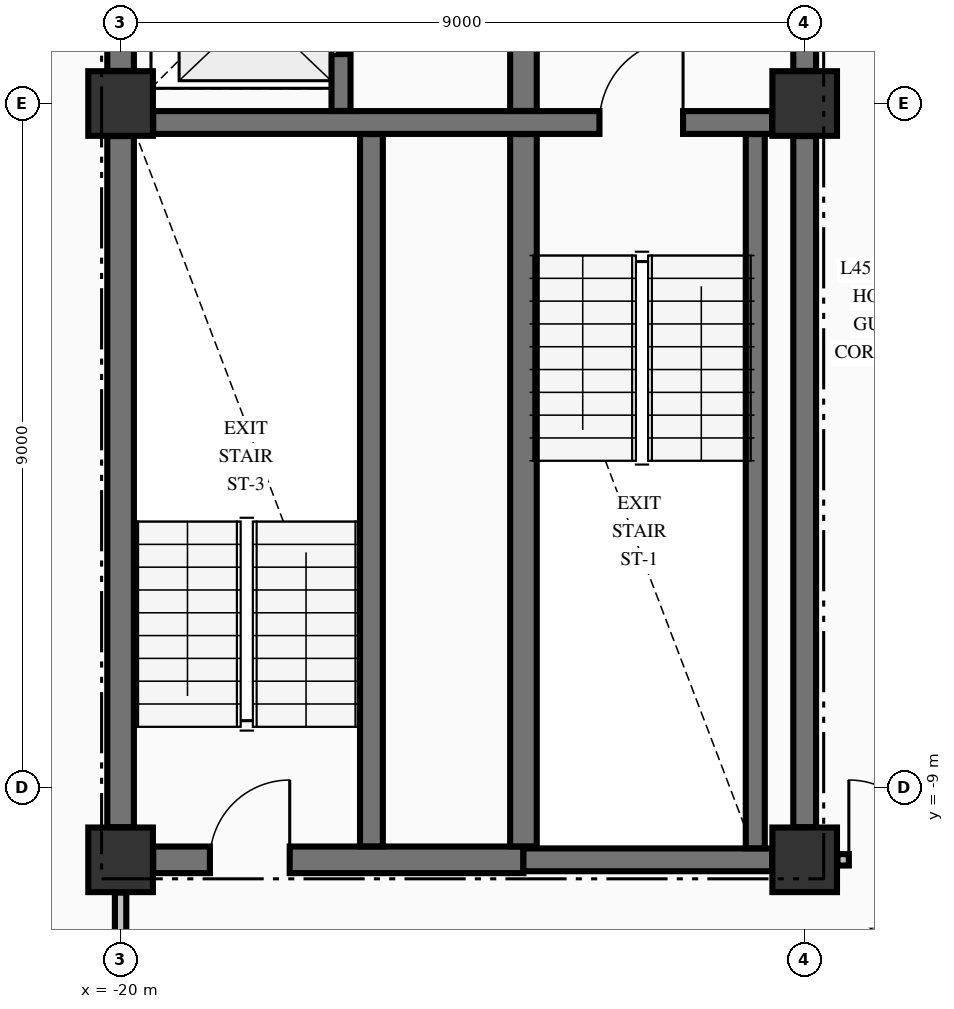
"""IFC4 building model, lengths in metres.
Left out: names, types, materials, properties, quantities, classifications, styles, units other than length and angle.
Written with IfcOpenShell. Run it as: python <this file> out.ifc"""

import sys

from ifc_helpers import new_model, si_unit, direction, frame, frame_2d, origin, origin_2d, place, context, subcontext, project, spatial, rectangle, extrude, element, fill, save


model = new_model("IFC4")
c1 = context("Model", 3, precision=1e-05, world=origin(), true_north=direction((0.0, 1.0)))
c2 = subcontext(c1, "Body", "Model", "MODEL_VIEW")
j1 = project(units=[si_unit("LENGTHUNIT", "METRE"), si_unit("PLANEANGLEUNIT", "RADIAN")], contexts=[c1])
p1 = place(None, origin())
s1 = spatial("IfcSite", under=j1, at=p1, CompositionType="ELEMENT")
p2 = place(p1, origin())
s2 = spatial("IfcBuilding", under=s1, at=p2, CompositionType="ELEMENT")
p3 = place(p2, frame((0.0, 0.0, 176.26)))
s3 = spatial("IfcBuildingStorey", under=s2, at=p3, CompositionType="ELEMENT", Elevation=176.26)
for number, where, z_axis, x_axis in (
    (1, (-20.0, -9.95, -0.275), (0.0, 0.0, 1.0), (1.0, 0.0, 0.0)),
    (2, (-11.0, -9.95, -0.275), (0.0, 0.0, 1.0), (1.0, 0.0, 0.0)),
    (3, (-11.0, 0.0, -0.275), (0.0, 0.0, 1.0), (1.0, 0.0, 0.0)),
    (4, (-20.0, 0.0, -0.275), (0.0, 0.0, 1.0), (1.0, 0.0, 0.0)),
):
    element("IfcColumn", number, at=place(p3, frame(where, z_axis=z_axis, x_axis=x_axis)), inside=s3, PredefinedType="COLUMN", context=c2, shape_type="SweptSolid", body=[
        extrude(rectangle(XDim=0.85, YDim=0.85, at=origin_2d()), origin(), (0.0, 0.0, 1.0), 3.425),
    ])
p4 = place(p3, frame((-19.571, -9.95, 0.0), z_axis=(0.0, 0.0, 1.0), x_axis=(1.0, 0.0, 0.0)))
e5 = element("IfcWall", 5, at=p4, inside=s3, PredefinedType="SHEAR", context=c2, shape_type="SweptSolid", body=[
    extrude(rectangle(XDim=4.871, YDim=0.35, at=frame_2d((2.436, 0.0))), origin(), (0.0, 0.0, 1.0), 3.15),
])
p5 = place(p4, frame((0.746, 0.0, 0.0)))
e6 = element("IfcOpeningElement", 6, at=p5, cuts=e5, PredefinedType="OPENING", context=c2, shape_type="SweptSolid", body=[
    extrude(rectangle(XDim=1.05, YDim=2.15, at=frame_2d((0.525, 1.075))), frame((0.0, 0.185, 0.0), z_axis=(0.0, -1.0, 0.0), x_axis=(1.0, 0.0, 0.0)), (0.0, 0.0, 1.0), 0.37),
])
p6 = place(p3, frame((-14.7, -9.95, 0.0), z_axis=(0.0, 0.0, 1.0), x_axis=(1.0, 0.0, 0.0)))
e7 = element("IfcWall", 7, at=p6, inside=s3, PredefinedType="SHEAR", context=c2, shape_type="SweptSolid", body=[
    extrude(rectangle(XDim=3.271, YDim=0.3, at=frame_2d((1.635, 0.0))), origin(), (0.0, 0.0, 1.0), 3.15),
])
p7 = place(p3, frame((-19.571, -0.25, 0.0), z_axis=(0.0, 0.0, 1.0), x_axis=(1.0, 0.0, 0.0)))
e8 = element("IfcWall", 8, at=p7, inside=s3, PredefinedType="SHEAR", context=c2, shape_type="SweptSolid", body=[
    extrude(rectangle(XDim=8.142, YDim=0.3, at=frame_2d((4.071, 0.0))), origin(), (0.0, 0.0, 1.0), 3.15),
])
p8 = place(p7, frame((5.871, 0.0, 0.0)))
e9 = element("IfcOpeningElement", 9, at=p8, cuts=e8, PredefinedType="OPENING", context=c2, shape_type="SweptSolid", body=[
    extrude(rectangle(XDim=1.1, YDim=2.15, at=frame_2d((0.55, 1.075))), frame((0.0, 0.16, 0.0), z_axis=(0.0, -1.0, 0.0), x_axis=(1.0, 0.0, 0.0)), (0.0, 0.0, 1.0), 0.32),
])
p9 = place(p3, frame((-10.569, -9.95, 0.0), z_axis=(0.0, 0.0, 1.0), x_axis=(1.0, 0.0, 0.0)))
e10 = element("IfcWall", 10, at=p9, inside=s3, PredefinedType="PARTITIONING", context=c2, shape_type="SweptSolid", body=[
    extrude(rectangle(XDim=21.138, YDim=0.15, at=frame_2d((10.569, 0.0))), origin(), (0.0, 0.0, 1.0), 3.15),
])
p10 = place(p9, frame((0.15, 0.0, 0.0)))
e11 = element("IfcOpeningElement", 11, at=p10, cuts=e10, PredefinedType="OPENING", context=c2, shape_type="SweptSolid", body=[
    extrude(rectangle(XDim=1.05, YDim=2.15, at=frame_2d((0.525, 1.075))), frame((0.0, 0.085, 0.0), z_axis=(0.0, -1.0, 0.0), x_axis=(1.0, 0.0, 0.0)), (0.0, 0.0, 1.0), 0.17),
])
p11 = place(p9, frame((19.938, 0.0, 0.0)))
e12 = element("IfcOpeningElement", 12, at=p11, cuts=e10, PredefinedType="OPENING", context=c2, shape_type="SweptSolid", body=[
    extrude(rectangle(XDim=1.05, YDim=2.15, at=frame_2d((0.525, 1.075))), frame((0.0, 0.085, 0.0), z_axis=(0.0, -1.0, 0.0), x_axis=(1.0, 0.0, 0.0)), (0.0, 0.0, 1.0), 0.17),
])
p12 = place(p9, frame((12.144, 0.0, 0.0)))
e13 = element("IfcOpeningElement", 13, at=p12, cuts=e10, PredefinedType="OPENING", context=c2, shape_type="SweptSolid", body=[
    extrude(rectangle(XDim=0.95, YDim=2.15, at=frame_2d((0.475, 1.075))), frame((0.0, 0.085, 0.0), z_axis=(0.0, -1.0, 0.0), x_axis=(1.0, 0.0, 0.0)), (0.0, 0.0, 1.0), 0.17),
])
p13 = place(p3, frame((-20.0, -9.521, 0.0), z_axis=(0.0, 0.0, 1.0), x_axis=(0.0, 1.0, 0.0)))
e14 = element("IfcWall", 14, at=p13, inside=s3, PredefinedType="SHEAR", context=c2, shape_type="SweptSolid", body=[
    extrude(rectangle(XDim=9.092, YDim=0.35, at=frame_2d((4.546, 0.0))), origin(), (0.0, 0.0, 1.0), 3.15),
])
p14 = place(p3, frame((-20.0, 0.429, 0.0), z_axis=(0.0, 0.0, 1.0), x_axis=(0.0, 1.0, 0.0)))
e15 = element("IfcWall", 15, at=p14, inside=s3, PredefinedType="SHEAR", context=c2, shape_type="SweptSolid", body=[
    extrude(rectangle(XDim=2.094, YDim=0.35, at=frame_2d((1.047, 0.0))), origin(), (0.0, 0.0, 1.0), 3.15),
])
p15 = place(p3, frame((-17.1, -0.098, 0.0), z_axis=(0.0, 0.0, 1.0), x_axis=(0.0, 1.0, 0.0)))
e16 = element("IfcWall", 16, at=p15, inside=s3, PredefinedType="SOLIDWALL", context=c2, shape_type="SweptSolid", body=[
    extrude(rectangle(XDim=2.621, YDim=0.25, at=frame_2d((1.311, 0.0))), origin(), (0.0, 0.0, 1.0), 3.15),
])
p16 = place(p15, frame((0.748, 0.0, 0.0)))
e17 = element("IfcOpeningElement", 17, at=p16, cuts=e16, PredefinedType="OPENING", context=c2, shape_type="SweptSolid", body=[
    extrude(rectangle(XDim=1.1, YDim=2.2, at=frame_2d((0.55, 1.1))), frame((0.0, 0.135, 0.0), z_axis=(0.0, -1.0, 0.0), x_axis=(1.0, 0.0, 0.0)), (0.0, 0.0, 1.0), 0.27),
])
p17 = place(p3, frame((-16.7, -9.773, 0.0), z_axis=(0.0, 0.0, 1.0), x_axis=(0.0, 1.0, 0.0)))
e18 = element("IfcWall", 18, at=p17, inside=s3, PredefinedType="SHEAR", context=c2, shape_type="SweptSolid", body=[
    extrude(rectangle(XDim=9.371, YDim=0.3, at=frame_2d((4.686, 0.0))), origin(), (0.0, 0.0, 1.0), 3.15),
])
p18 = place(p3, frame((-14.7, -9.773, 0.0), z_axis=(0.0, 0.0, 1.0), x_axis=(0.0, 1.0, 0.0)))
e19 = element("IfcWall", 19, at=p18, inside=s3, PredefinedType="SHEAR", context=c2, shape_type="SweptSolid", body=[
    extrude(rectangle(XDim=9.371, YDim=0.35, at=frame_2d((4.686, 0.0))), origin(), (0.0, 0.0, 1.0), 3.15),
])
p19 = place(p3, frame((-14.7, -0.098, 0.0), z_axis=(0.0, 0.0, 1.0), x_axis=(0.0, 1.0, 0.0)))
e20 = element("IfcWall", 20, at=p19, inside=s3, PredefinedType="SHEAR", context=c2, shape_type="SweptSolid", body=[
    extrude(rectangle(XDim=2.846, YDim=0.35, at=frame_2d((1.423, 0.0))), origin(), (0.0, 0.0, 1.0), 3.15),
])
p20 = place(p3, frame((-11.65, -9.798, 0.0), z_axis=(0.0, 0.0, 1.0), x_axis=(0.0, 1.0, 0.0)))
e21 = element("IfcWall", 21, at=p20, inside=s3, PredefinedType="SOLIDWALL", context=c2, shape_type="SweptSolid", body=[
    extrude(rectangle(XDim=9.396, YDim=0.25, at=frame_2d((4.698, 0.0))), origin(), (0.0, 0.0, 1.0), 3.15),
])
p21 = place(p3, frame((-11.0, -9.521, 0.0), z_axis=(0.0, 0.0, 1.0), x_axis=(0.0, 1.0, 0.0)))
e22 = element("IfcWall", 22, at=p21, inside=s3, PredefinedType="SHEAR", context=c2, shape_type="SweptSolid", body=[
    extrude(rectangle(XDim=9.092, YDim=0.3, at=frame_2d((4.546, 0.0))), origin(), (0.0, 0.0, 1.0), 3.15),
])
p22 = place(p3, frame((-11.0, 0.429, 0.0), z_axis=(0.0, 0.0, 1.0), x_axis=(0.0, 1.0, 0.0)))
e23 = element("IfcWall", 23, at=p22, inside=s3, PredefinedType="SHEAR", context=c2, shape_type="SweptSolid", body=[
    extrude(rectangle(XDim=2.319, YDim=0.3, at=frame_2d((1.16, 0.0))), origin(), (0.0, 0.0, 1.0), 3.15),
])
p23 = place(p22, frame((0.671, 0.0, 0.0)))
e24 = element("IfcOpeningElement", 24, at=p23, cuts=e23, PredefinedType="OPENING", context=c2, shape_type="SweptSolid", body=[
    extrude(rectangle(XDim=1.1, YDim=2.15, at=frame_2d((0.55, 1.075))), frame((0.0, 0.16, 0.0), z_axis=(0.0, -1.0, 0.0), x_axis=(1.0, 0.0, 0.0)), (0.0, 0.0, 1.0), 0.32),
])
p24 = place(p3, frame((-20.0, -12.722, 0.0), z_axis=(0.0, 0.0, 1.0), x_axis=(0.0, 1.0, 0.0)))
e25 = element("IfcWall", 25, at=p24, inside=s3, PredefinedType="PARTITIONING", context=c2, shape_type="SweptSolid", body=[
    extrude(rectangle(XDim=2.341, YDim=0.15, at=frame_2d((1.17, 0.0))), origin(), (0.0, 0.0, 1.0), 2.342),
])
p25 = place(p8, origin())
e26 = element("IfcDoor", 26, at=p25, inside=s3, OperationType="SINGLE_SWING_RIGHT", PredefinedType="DOOR", context=c2, shape_type="SweptSolid", body=[
    extrude(rectangle(XDim=1.1, YDim=2.15, at=frame_2d((0.55, 1.075))), frame((0.0, 0.025, 0.0), z_axis=(0.0, -1.0, 0.0), x_axis=(1.0, 0.0, 0.0)), (0.0, 0.0, 1.0), 0.05),
])
fill(e9, e26)
p26 = place(p5, origin())
e27 = element("IfcDoor", 27, at=p26, inside=s3, OperationType="SINGLE_SWING_RIGHT", PredefinedType="DOOR", context=c2, shape_type="SweptSolid", body=[
    extrude(rectangle(XDim=1.05, YDim=2.15, at=frame_2d((0.525, 1.075))), frame((0.0, 0.025, 0.0), z_axis=(0.0, -1.0, 0.0), x_axis=(1.0, 0.0, 0.0)), (0.0, 0.0, 1.0), 0.05),
])
fill(e6, e27)
p27 = place(p16, origin())
e28 = element("IfcDoor", 28, at=p27, inside=s3, OperationType="SLIDING_TO_LEFT", PredefinedType="DOOR", context=c2, shape_type="SweptSolid", body=[
    extrude(rectangle(XDim=1.1, YDim=2.2, at=frame_2d((0.55, 1.1))), frame((0.0, 0.025, 0.0), z_axis=(0.0, -1.0, 0.0), x_axis=(1.0, 0.0, 0.0)), (0.0, 0.0, 1.0), 0.05),
])
fill(e17, e28)
p28 = place(p10, origin())
e29 = element("IfcDoor", 29, at=p28, inside=s3, OperationType="SINGLE_SWING_LEFT", PredefinedType="DOOR", context=c2, shape_type="SweptSolid", body=[
    extrude(rectangle(XDim=1.05, YDim=2.15, at=frame_2d((0.525, 1.075))), frame((0.0, 0.025, 0.0), z_axis=(0.0, -1.0, 0.0), x_axis=(1.0, 0.0, 0.0)), (0.0, 0.0, 1.0), 0.05),
])
fill(e11, e29)
save(model, sys.argv[1])
